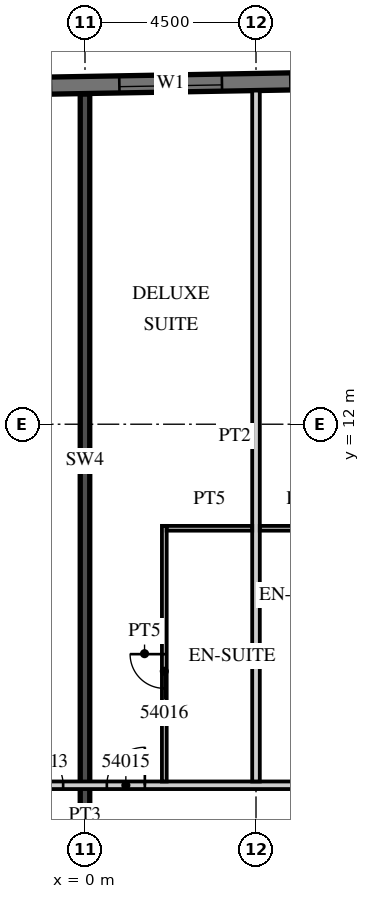
"""IFC4 building model, lengths in metres.
Left out: names, types, materials, properties, quantities, classifications, styles, units other than length and angle.
Written with IfcOpenShell. Run it as: python <this file> out.ifc"""

import sys

from ifc_helpers import new_model, si_unit, direction, frame, frame_2d, origin, place, context, subcontext, project, spatial, rectangle, extrude, element, fill, save


model = new_model("IFC4")
c1 = context("Model", 3, precision=1e-05, world=origin(), true_north=direction((0.0, 1.0)))
c2 = subcontext(c1, "Body", "Model", "MODEL_VIEW")
j1 = project(units=[si_unit("LENGTHUNIT", "METRE"), si_unit("PLANEANGLEUNIT", "RADIAN")], contexts=[c1])
p1 = place(None, origin())
s1 = spatial("IfcSite", under=j1, at=p1, CompositionType="ELEMENT")
p2 = place(p1, origin())
s2 = spatial("IfcBuilding", under=s1, at=p2, CompositionType="ELEMENT")
p3 = place(p2, frame((0.0, 0.0, 224.3)))
s3 = spatial("IfcBuildingStorey", under=s2, at=p3, CompositionType="ELEMENT", Elevation=224.3)
p4 = place(p3, frame((0.0, 1.4, 0.0), z_axis=(0.0, 0.0, 1.0), x_axis=(0.0, 1.0, 0.0)))
e1 = element("IfcWall", 1, at=p4, inside=s3, PredefinedType="SHEAR", context=c2, shape_type="SweptSolid", body=[
    extrude(rectangle(XDim=19.289, YDim=0.25, at=frame_2d((9.644, 0.0))), origin(), (0.0, 0.0, 1.0), 3.3),
])
p5 = place(p3, frame((13.504, 21.161, 0.0), z_axis=(0.0, 0.0, 1.0), x_axis=(-0.999847763257, -0.017448504532, 0.0)))
e2 = element("IfcWall", 2, at=p5, inside=s3, PredefinedType="SOLIDWALL", context=c2, shape_type="SweptSolid", body=[
    extrude(rectangle(XDim=46.859, YDim=0.45, at=frame_2d((23.43, 0.0))), origin(), (0.0, 0.0, 1.0), 3.02),
])
p6 = place(p5, frame((0.9, 0.0, 0.45)))
e3 = element("IfcOpeningElement", 3, at=p6, cuts=e2, PredefinedType="OPENING", context=c2, shape_type="SweptSolid", body=[
    extrude(rectangle(XDim=2.7, YDim=2.25, at=frame_2d((1.35, 1.125))), frame((0.0, 0.235, 0.0), z_axis=(0.0, -1.0, 0.0), x_axis=(1.0, 0.0, 0.0)), (0.0, 0.0, 1.0), 0.47),
])
p7 = place(p5, frame((5.401, 0.0, 0.45)))
e4 = element("IfcOpeningElement", 4, at=p7, cuts=e2, PredefinedType="OPENING", context=c2, shape_type="SweptSolid", body=[
    extrude(rectangle(XDim=2.7, YDim=2.25, at=frame_2d((1.35, 1.125))), frame((0.0, 0.235, 0.0), z_axis=(0.0, -1.0, 0.0), x_axis=(1.0, 0.0, 0.0)), (0.0, 0.0, 1.0), 0.47),
])
p8 = place(p5, frame((9.902, 0.0, 0.45)))
e5 = element("IfcOpeningElement", 5, at=p8, cuts=e2, PredefinedType="OPENING", context=c2, shape_type="SweptSolid", body=[
    extrude(rectangle(XDim=2.7, YDim=2.25, at=frame_2d((1.35, 1.125))), frame((0.0, 0.235, 0.0), z_axis=(0.0, -1.0, 0.0), x_axis=(1.0, 0.0, 0.0)), (0.0, 0.0, 1.0), 0.47),
])
p9 = place(p5, frame((14.402, 0.0, 0.45)))
e6 = element("IfcOpeningElement", 6, at=p9, cuts=e2, PredefinedType="OPENING", context=c2, shape_type="SweptSolid", body=[
    extrude(rectangle(XDim=2.7, YDim=2.25, at=frame_2d((1.35, 1.125))), frame((0.0, 0.235, 0.0), z_axis=(0.0, -1.0, 0.0), x_axis=(1.0, 0.0, 0.0)), (0.0, 0.0, 1.0), 0.47),
])
p10 = place(p5, frame((18.903, 0.0, 0.45)))
e7 = element("IfcOpeningElement", 7, at=p10, cuts=e2, PredefinedType="OPENING", context=c2, shape_type="SweptSolid", body=[
    extrude(rectangle(XDim=2.7, YDim=2.25, at=frame_2d((1.35, 1.125))), frame((0.0, 0.235, 0.0), z_axis=(0.0, -1.0, 0.0), x_axis=(1.0, 0.0, 0.0)), (0.0, 0.0, 1.0), 0.47),
])
p11 = place(p5, frame((23.404, 0.0, 0.45)))
e8 = element("IfcOpeningElement", 8, at=p11, cuts=e2, PredefinedType="OPENING", context=c2, shape_type="SweptSolid", body=[
    extrude(rectangle(XDim=2.7, YDim=2.25, at=frame_2d((1.35, 1.125))), frame((0.0, 0.235, 0.0), z_axis=(0.0, -1.0, 0.0), x_axis=(1.0, 0.0, 0.0)), (0.0, 0.0, 1.0), 0.47),
])
p12 = place(p5, frame((27.904, 0.0, 0.45)))
e9 = element("IfcOpeningElement", 9, at=p12, cuts=e2, PredefinedType="OPENING", context=c2, shape_type="SweptSolid", body=[
    extrude(rectangle(XDim=2.7, YDim=2.25, at=frame_2d((1.35, 1.125))), frame((0.0, 0.235, 0.0), z_axis=(0.0, -1.0, 0.0), x_axis=(1.0, 0.0, 0.0)), (0.0, 0.0, 1.0), 0.47),
])
p13 = place(p5, frame((32.405, 0.0, 0.45)))
e10 = element("IfcOpeningElement", 10, at=p13, cuts=e2, PredefinedType="OPENING", context=c2, shape_type="SweptSolid", body=[
    extrude(rectangle(XDim=2.7, YDim=2.25, at=frame_2d((1.35, 1.125))), frame((0.0, 0.235, 0.0), z_axis=(0.0, -1.0, 0.0), x_axis=(1.0, 0.0, 0.0)), (0.0, 0.0, 1.0), 0.47),
])
p14 = place(p5, frame((36.906, 0.0, 0.45)))
e11 = element("IfcOpeningElement", 11, at=p14, cuts=e2, PredefinedType="OPENING", context=c2, shape_type="SweptSolid", body=[
    extrude(rectangle(XDim=2.7, YDim=2.25, at=frame_2d((1.35, 1.125))), frame((0.0, 0.235, 0.0), z_axis=(0.0, -1.0, 0.0), x_axis=(1.0, 0.0, 0.0)), (0.0, 0.0, 1.0), 0.47),
])
p15 = place(p5, frame((41.406, 0.0, 0.45)))
e12 = element("IfcOpeningElement", 12, at=p15, cuts=e2, PredefinedType="OPENING", context=c2, shape_type="SweptSolid", body=[
    extrude(rectangle(XDim=2.7, YDim=2.25, at=frame_2d((1.35, 1.125))), frame((0.0, 0.235, 0.0), z_axis=(0.0, -1.0, 0.0), x_axis=(1.0, 0.0, 0.0)), (0.0, 0.0, 1.0), 0.47),
])
p16 = place(p3, frame((-13.5, 2.5, 0.0), z_axis=(0.0, 0.0, 1.0), x_axis=(1.0, 0.0, 0.0)))
e13 = element("IfcWall", 13, at=p16, inside=s3, PredefinedType="PARTITIONING", context=c2, shape_type="SweptSolid", body=[
    extrude(rectangle(XDim=27.0, YDim=0.2, at=frame_2d((13.5, 0.0))), origin(), (0.0, 0.0, 1.0), 3.02),
])
p17 = place(p16, frame((2.925, 0.0, 0.0)))
e14 = element("IfcOpeningElement", 14, at=p17, cuts=e13, PredefinedType="OPENING", context=c2, shape_type="SweptSolid", body=[
    extrude(rectangle(XDim=1.0, YDim=2.1, at=frame_2d((0.5, 1.05))), frame((0.0, 0.11, 0.0), z_axis=(0.0, -1.0, 0.0), x_axis=(1.0, 0.0, 0.0)), (0.0, 0.0, 1.0), 0.22),
])
p18 = place(p16, frame((7.45, 0.0, 0.0)))
e15 = element("IfcOpeningElement", 15, at=p18, cuts=e13, PredefinedType="OPENING", context=c2, shape_type="SweptSolid", body=[
    extrude(rectangle(XDim=1.0, YDim=2.1, at=frame_2d((0.5, 1.05))), frame((0.0, 0.11, 0.0), z_axis=(0.0, -1.0, 0.0), x_axis=(1.0, 0.0, 0.0)), (0.0, 0.0, 1.0), 0.22),
])
p19 = place(p16, frame((11.925, 0.0, 0.0)))
e16 = element("IfcOpeningElement", 16, at=p19, cuts=e13, PredefinedType="OPENING", context=c2, shape_type="SweptSolid", body=[
    extrude(rectangle(XDim=1.0, YDim=2.1, at=frame_2d((0.5, 1.05))), frame((0.0, 0.11, 0.0), z_axis=(0.0, -1.0, 0.0), x_axis=(1.0, 0.0, 0.0)), (0.0, 0.0, 1.0), 0.22),
])
p20 = place(p16, frame((14.075, 0.0, 0.0)))
e17 = element("IfcOpeningElement", 17, at=p20, cuts=e13, PredefinedType="OPENING", context=c2, shape_type="SweptSolid", body=[
    extrude(rectangle(XDim=1.0, YDim=2.1, at=frame_2d((0.5, 1.05))), frame((0.0, 0.11, 0.0), z_axis=(0.0, -1.0, 0.0), x_axis=(1.0, 0.0, 0.0)), (0.0, 0.0, 1.0), 0.22),
])
p21 = place(p16, frame((20.925, 0.0, 0.0)))
e18 = element("IfcOpeningElement", 18, at=p21, cuts=e13, PredefinedType="OPENING", context=c2, shape_type="SweptSolid", body=[
    extrude(rectangle(XDim=1.0, YDim=2.1, at=frame_2d((0.5, 1.05))), frame((0.0, 0.11, 0.0), z_axis=(0.0, -1.0, 0.0), x_axis=(1.0, 0.0, 0.0)), (0.0, 0.0, 1.0), 0.22),
])
p22 = place(p16, frame((25.425, 0.0, 0.0)))
e19 = element("IfcOpeningElement", 19, at=p22, cuts=e13, PredefinedType="OPENING", context=c2, shape_type="SweptSolid", body=[
    extrude(rectangle(XDim=1.0, YDim=2.1, at=frame_2d((0.5, 1.05))), frame((0.0, 0.11, 0.0), z_axis=(0.0, -1.0, 0.0), x_axis=(1.0, 0.0, 0.0)), (0.0, 0.0, 1.0), 0.22),
])
p23 = place(p3, frame((4.5, 2.6, 0.0), z_axis=(0.0, 0.0, 1.0), x_axis=(0.0, 1.0, 0.0)))
e20 = element("IfcWall", 20, at=p23, inside=s3, PredefinedType="PARTITIONING", context=c2, shape_type="SweptSolid", body=[
    extrude(rectangle(XDim=18.179, YDim=0.2, at=frame_2d((9.089, 0.0))), origin(), (0.0, 0.0, 1.0), 3.02),
])
p24 = place(p3, frame((2.087, 2.6, 0.0), z_axis=(0.0, 0.0, 1.0), x_axis=(0.0, 1.0, 0.0)))
e21 = element("IfcWall", 21, at=p24, inside=s3, PredefinedType="PARTITIONING", context=c2, shape_type="SweptSolid", body=[
    extrude(rectangle(XDim=6.725, YDim=0.125, at=frame_2d((3.362, 0.0))), origin(), (0.0, 0.0, 1.0), 3.02),
])
p25 = place(p24, frame((2.45, 0.0, 0.0)))
e22 = element("IfcOpeningElement", 22, at=p25, cuts=e21, PredefinedType="OPENING", context=c2, shape_type="SweptSolid", body=[
    extrude(rectangle(XDim=0.9, YDim=2.1, at=frame_2d((0.45, 1.05))), frame((0.0, 0.073, 0.0), z_axis=(0.0, -1.0, 0.0), x_axis=(1.0, 0.0, 0.0)), (0.0, 0.0, 1.0), 0.145),
])
for number, where, z_axis, x_axis in (
    (23, (2.15, 9.262, 0.0), (0.0, 0.0, 1.0), (1.0, 0.0, 0.0)),
    (24, (4.6, 9.262, 0.0), (0.0, 0.0, 1.0), (1.0, 0.0, 0.0)),
):
    element("IfcWall", number, at=place(p3, frame(where, z_axis=z_axis, x_axis=x_axis)), inside=s3, PredefinedType="PARTITIONING", context=c2, shape_type="SweptSolid", body=[
        extrude(rectangle(XDim=2.25, YDim=0.125, at=frame_2d((1.125, 0.0))), origin(), (0.0, 0.0, 1.0), 3.02),
    ])
p26 = place(p8, origin())
e25 = element("IfcWindow", 25, at=p26, inside=s3, PartitioningType="SINGLE_PANEL", PredefinedType="WINDOW", context=c2, shape_type="SweptSolid", body=[
    extrude(rectangle(XDim=2.7, YDim=2.25, at=frame_2d((1.35, 1.125))), frame((0.0, 0.09, 0.0), z_axis=(0.0, -1.0, 0.0), x_axis=(1.0, 0.0, 0.0)), (0.0, 0.0, 1.0), 0.06),
])
fill(e5, e25)
p27 = place(p19, origin())
e26 = element("IfcDoor", 26, at=p27, inside=s3, OperationType="SINGLE_SWING_LEFT", PredefinedType="DOOR", context=c2, shape_type="SweptSolid", body=[
    extrude(rectangle(XDim=1.0, YDim=2.1, at=frame_2d((0.5, 1.05))), frame((0.0, 0.025, 0.0), z_axis=(0.0, -1.0, 0.0), x_axis=(1.0, 0.0, 0.0)), (0.0, 0.0, 1.0), 0.05),
])
fill(e16, e26)
p28 = place(p20, origin())
e27 = element("IfcDoor", 27, at=p28, inside=s3, OperationType="SINGLE_SWING_RIGHT", PredefinedType="DOOR", context=c2, shape_type="SweptSolid", body=[
    extrude(rectangle(XDim=1.0, YDim=2.1, at=frame_2d((0.5, 1.05))), frame((0.0, 0.025, 0.0), z_axis=(0.0, -1.0, 0.0), x_axis=(1.0, 0.0, 0.0)), (0.0, 0.0, 1.0), 0.05),
])
fill(e17, e27)
p29 = place(p25, origin())
e28 = element("IfcDoor", 28, at=p29, inside=s3, OperationType="SINGLE_SWING_RIGHT", PredefinedType="DOOR", context=c2, shape_type="SweptSolid", body=[
    extrude(rectangle(XDim=0.9, YDim=2.1, at=frame_2d((0.45, 1.05))), frame((0.0, 0.025, 0.0), z_axis=(0.0, -1.0, 0.0), x_axis=(1.0, 0.0, 0.0)), (0.0, 0.0, 1.0), 0.05),
])
fill(e22, e28)
save(model, sys.argv[1])
